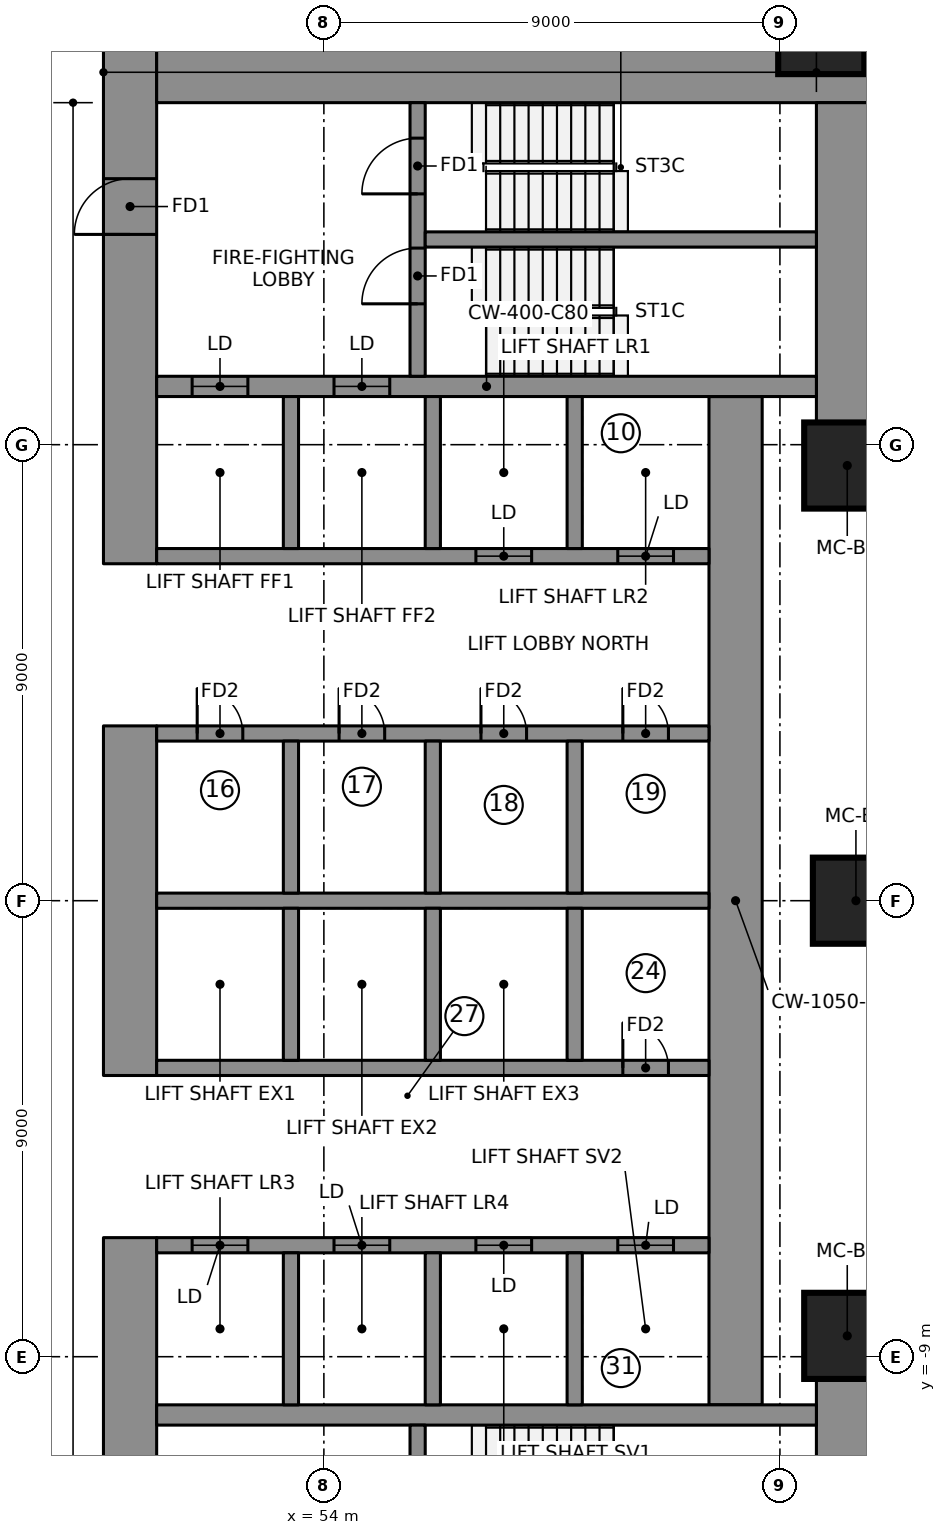
"""IFC4 building model, lengths in metres.
Left out: names, types, materials, properties, quantities, classifications, styles, units other than length and angle.
Written with IfcOpenShell. Run it as: python <this file> out.ifc"""

import sys

from ifc_helpers import new_model, si_unit, direction, frame, frame_2d, origin, origin_2d, place, context, subcontext, project, spatial, rectangle, extrude, element, fill, save


model = new_model("IFC4")
c1 = context("Model", 3, precision=1e-05, world=origin(), true_north=direction((0.0, 1.0)))
c2 = subcontext(c1, "Body", "Model", "MODEL_VIEW")
j1 = project(units=[si_unit("LENGTHUNIT", "METRE"), si_unit("PLANEANGLEUNIT", "RADIAN")], contexts=[c1])
p1 = place(None, origin())
s1 = spatial("IfcSite", under=j1, at=p1, CompositionType="ELEMENT")
p2 = place(p1, origin())
s2 = spatial("IfcBuilding", under=s1, at=p2, CompositionType="ELEMENT")
p3 = place(p2, frame((0.0, 0.0, 116.85)))
s3 = spatial("IfcBuildingStorey", under=s2, at=p3, CompositionType="ELEMENT", Elevation=116.85)
p4 = place(p3, frame((50.175, 6.65, 0.0), z_axis=(0.0, 0.0, 1.0), x_axis=(0.0, 1.0, 0.0)))
e1 = element("IfcWall", 1, at=p4, inside=s3, PredefinedType="SHEAR", context=c2, shape_type="SweptSolid", body=[
    extrude(rectangle(XDim=10.15, YDim=1.05, at=frame_2d((5.075, 0.0))), origin(), (0.0, 0.0, 1.0), 3.55),
])
p5 = place(p4, frame((6.5, 0.0, 0.0)))
e2 = element("IfcOpeningElement", 2, at=p5, cuts=e1, PredefinedType="OPENING", context=c2, shape_type="SweptSolid", body=[
    extrude(rectangle(XDim=1.1, YDim=2.1, at=frame_2d((0.55, 1.05))), frame((0.0, 0.535, 0.0), z_axis=(0.0, -1.0, 0.0), x_axis=(1.0, 0.0, 0.0)), (0.0, 0.0, 1.0), 1.07),
])
p6 = place(p3, frame((50.175, -3.45, 0.0), z_axis=(0.0, 0.0, 1.0), x_axis=(0.0, 1.0, 0.0)))
e3 = element("IfcWall", 3, at=p6, inside=s3, PredefinedType="SHEAR", context=c2, shape_type="SweptSolid", body=[
    extrude(rectangle(XDim=6.9, YDim=1.05, at=frame_2d((3.45, 0.0))), origin(), (0.0, 0.0, 1.0), 3.55),
])
p7 = place(p3, frame((50.175, -16.8, 0.0), z_axis=(0.0, 0.0, 1.0), x_axis=(0.0, 1.0, 0.0)))
e4 = element("IfcWall", 4, at=p7, inside=s3, PredefinedType="SHEAR", context=c2, shape_type="SweptSolid", body=[
    extrude(rectangle(XDim=10.15, YDim=1.05, at=frame_2d((5.075, 0.0))), origin(), (0.0, 0.0, 1.0), 3.55),
])
p8 = place(p7, frame((2.55, 0.0, 0.0)))
e5 = element("IfcOpeningElement", 5, at=p8, cuts=e4, PredefinedType="OPENING", context=c2, shape_type="SweptSolid", body=[
    extrude(rectangle(XDim=1.1, YDim=2.1, at=frame_2d((0.55, 1.05))), frame((0.0, 0.535, 0.0), z_axis=(0.0, -1.0, 0.0), x_axis=(1.0, 0.0, 0.0)), (0.0, 0.0, 1.0), 1.07),
])
p9 = place(p3, frame((50.7, 16.275, 0.0), z_axis=(0.0, 0.0, 1.0), x_axis=(1.0, 0.0, 0.0)))
e6 = element("IfcWall", 6, at=p9, inside=s3, PredefinedType="SHEAR", context=c2, shape_type="SweptSolid", body=[
    extrude(rectangle(XDim=14.07, YDim=1.05, at=frame_2d((7.035, 0.0))), origin(), (0.0, 0.0, 1.0), 3.55),
])
for number, where, z_axis, x_axis in (
    (7, (64.245, 9.389, 0.0), (0.0, 0.0, 1.0), (0.0, 1.0, 0.0)),
    (8, (64.245, -15.75, 0.0), (0.0, 0.0, 1.0), (0.0, 1.0, 0.0)),
):
    element("IfcWall", number, at=place(p3, frame(where, z_axis=z_axis, x_axis=x_axis)), inside=s3, PredefinedType="SHEAR", context=c2, shape_type="SweptSolid", body=[
        extrude(rectangle(XDim=6.361, YDim=1.05, at=frame_2d((3.181, 0.0))), origin(), (0.0, 0.0, 1.0), 3.55),
    ])
p10 = place(p3, frame((62.125, -9.95, 0.0), z_axis=(0.0, 0.0, 1.0), x_axis=(0.0, 1.0, 0.0)))
e9 = element("IfcWall", 9, at=p10, inside=s3, PredefinedType="SHEAR", context=c2, shape_type="SweptSolid", body=[
    extrude(rectangle(XDim=19.9, YDim=1.05, at=frame_2d((9.95, 0.0))), origin(), (0.0, 0.0, 1.0), 3.55),
])
p11 = place(p3, frame((50.7, 10.15, 0.0), z_axis=(0.0, 0.0, 1.0), x_axis=(1.0, 0.0, 0.0)))
e10 = element("IfcWall", 10, at=p11, inside=s3, PredefinedType="SHEAR", context=c2, shape_type="SweptSolid", body=[
    extrude(rectangle(XDim=13.02, YDim=0.4, at=frame_2d((6.51, 0.0))), origin(), (0.0, 0.0, 1.0), 3.55),
])
p12 = place(p11, frame((0.7, 0.0, 0.0)))
e11 = element("IfcOpeningElement", 11, at=p12, cuts=e10, PredefinedType="OPENING", context=c2, shape_type="SweptSolid", body=[
    extrude(rectangle(XDim=1.1, YDim=2.1, at=frame_2d((0.55, 1.05))), frame((0.0, 0.21, 0.0), z_axis=(0.0, -1.0, 0.0), x_axis=(1.0, 0.0, 0.0)), (0.0, 0.0, 1.0), 0.42),
])
p13 = place(p11, frame((3.5, 0.0, 0.0)))
e12 = element("IfcOpeningElement", 12, at=p13, cuts=e10, PredefinedType="OPENING", context=c2, shape_type="SweptSolid", body=[
    extrude(rectangle(XDim=1.1, YDim=2.1, at=frame_2d((0.55, 1.05))), frame((0.0, 0.21, 0.0), z_axis=(0.0, -1.0, 0.0), x_axis=(1.0, 0.0, 0.0)), (0.0, 0.0, 1.0), 0.42),
])
p14 = place(p3, frame((50.7, -10.15, 0.0), z_axis=(0.0, 0.0, 1.0), x_axis=(1.0, 0.0, 0.0)))
e13 = element("IfcWall", 13, at=p14, inside=s3, PredefinedType="SHEAR", context=c2, shape_type="SweptSolid", body=[
    extrude(rectangle(XDim=13.02, YDim=0.4, at=frame_2d((6.51, 0.0))), origin(), (0.0, 0.0, 1.0), 3.55),
])
p15 = place(p3, frame((50.7, 0.0, 0.0), z_axis=(0.0, 0.0, 1.0), x_axis=(1.0, 0.0, 0.0)))
e14 = element("IfcWall", 14, at=p15, inside=s3, PredefinedType="SHEAR", context=c2, shape_type="SweptSolid", body=[
    extrude(rectangle(XDim=10.9, YDim=0.3, at=frame_2d((5.45, 0.0))), origin(), (0.0, 0.0, 1.0), 3.55),
])
p16 = place(p3, frame((50.7, 3.3, 0.0), z_axis=(0.0, 0.0, 1.0), x_axis=(1.0, 0.0, 0.0)))
e15 = element("IfcWall", 15, at=p16, inside=s3, PredefinedType="SHEAR", context=c2, shape_type="SweptSolid", body=[
    extrude(rectangle(XDim=10.9, YDim=0.3, at=frame_2d((5.45, 0.0))), origin(), (0.0, 0.0, 1.0), 3.55),
])
p17 = place(p16, frame((0.8, 0.0, 0.0)))
e16 = element("IfcOpeningElement", 16, at=p17, cuts=e15, PredefinedType="OPENING", context=c2, shape_type="SweptSolid", body=[
    extrude(rectangle(XDim=0.9, YDim=2.1, at=frame_2d((0.45, 1.05))), frame((0.0, 0.16, 0.0), z_axis=(0.0, -1.0, 0.0), x_axis=(1.0, 0.0, 0.0)), (0.0, 0.0, 1.0), 0.32),
])
p18 = place(p16, frame((3.6, 0.0, 0.0)))
e17 = element("IfcOpeningElement", 17, at=p18, cuts=e15, PredefinedType="OPENING", context=c2, shape_type="SweptSolid", body=[
    extrude(rectangle(XDim=0.9, YDim=2.1, at=frame_2d((0.45, 1.05))), frame((0.0, 0.16, 0.0), z_axis=(0.0, -1.0, 0.0), x_axis=(1.0, 0.0, 0.0)), (0.0, 0.0, 1.0), 0.32),
])
p19 = place(p16, frame((6.4, 0.0, 0.0)))
e18 = element("IfcOpeningElement", 18, at=p19, cuts=e15, PredefinedType="OPENING", context=c2, shape_type="SweptSolid", body=[
    extrude(rectangle(XDim=0.9, YDim=2.1, at=frame_2d((0.45, 1.05))), frame((0.0, 0.16, 0.0), z_axis=(0.0, -1.0, 0.0), x_axis=(1.0, 0.0, 0.0)), (0.0, 0.0, 1.0), 0.32),
])
p20 = place(p16, frame((9.2, 0.0, 0.0)))
e19 = element("IfcOpeningElement", 19, at=p20, cuts=e15, PredefinedType="OPENING", context=c2, shape_type="SweptSolid", body=[
    extrude(rectangle(XDim=0.9, YDim=2.1, at=frame_2d((0.45, 1.05))), frame((0.0, 0.16, 0.0), z_axis=(0.0, -1.0, 0.0), x_axis=(1.0, 0.0, 0.0)), (0.0, 0.0, 1.0), 0.32),
])
p21 = place(p3, frame((50.7, 6.8, 0.0), z_axis=(0.0, 0.0, 1.0), x_axis=(1.0, 0.0, 0.0)))
e20 = element("IfcWall", 20, at=p21, inside=s3, PredefinedType="SHEAR", context=c2, shape_type="SweptSolid", body=[
    extrude(rectangle(XDim=10.9, YDim=0.3, at=frame_2d((5.45, 0.0))), origin(), (0.0, 0.0, 1.0), 3.55),
])
p22 = place(p21, frame((6.3, 0.0, 0.0)))
e21 = element("IfcOpeningElement", 21, at=p22, cuts=e20, PredefinedType="OPENING", context=c2, shape_type="SweptSolid", body=[
    extrude(rectangle(XDim=1.1, YDim=2.1, at=frame_2d((0.55, 1.05))), frame((0.0, 0.16, 0.0), z_axis=(0.0, -1.0, 0.0), x_axis=(1.0, 0.0, 0.0)), (0.0, 0.0, 1.0), 0.32),
])
p23 = place(p21, frame((9.1, 0.0, 0.0)))
e22 = element("IfcOpeningElement", 22, at=p23, cuts=e20, PredefinedType="OPENING", context=c2, shape_type="SweptSolid", body=[
    extrude(rectangle(XDim=1.1, YDim=2.1, at=frame_2d((0.55, 1.05))), frame((0.0, 0.16, 0.0), z_axis=(0.0, -1.0, 0.0), x_axis=(1.0, 0.0, 0.0)), (0.0, 0.0, 1.0), 0.32),
])
for number, where, z_axis, x_axis in (
    (23, (53.35, 0.15, 0.0), (0.0, 0.0, 1.0), (0.0, 1.0, 0.0)),
    (24, (53.35, 6.95, 0.0), (0.0, 0.0, 1.0), (0.0, 1.0, 0.0)),
    (25, (56.15, 0.15, 0.0), (0.0, 0.0, 1.0), (0.0, 1.0, 0.0)),
    (26, (56.15, 6.95, 0.0), (0.0, 0.0, 1.0), (0.0, 1.0, 0.0)),
    (27, (58.95, 0.15, 0.0), (0.0, 0.0, 1.0), (0.0, 1.0, 0.0)),
    (28, (58.95, 6.95, 0.0), (0.0, 0.0, 1.0), (0.0, 1.0, 0.0)),
):
    element("IfcWall", number, at=place(p3, frame(where, z_axis=z_axis, x_axis=x_axis)), inside=s3, PredefinedType="SHEAR", context=c2, shape_type="SweptSolid", body=[
        extrude(rectangle(XDim=3.0, YDim=0.3, at=frame_2d((1.5, 0.0))), origin(), (0.0, 0.0, 1.0), 3.55),
    ])
p24 = place(p3, frame((50.7, -3.3, 0.0), z_axis=(0.0, 0.0, 1.0), x_axis=(1.0, 0.0, 0.0)))
e29 = element("IfcWall", 29, at=p24, inside=s3, PredefinedType="SHEAR", context=c2, shape_type="SweptSolid", body=[
    extrude(rectangle(XDim=10.9, YDim=0.3, at=frame_2d((5.45, 0.0))), origin(), (0.0, 0.0, 1.0), 3.55),
])
p25 = place(p24, frame((9.2, 0.0, 0.0)))
e30 = element("IfcOpeningElement", 30, at=p25, cuts=e29, PredefinedType="OPENING", context=c2, shape_type="SweptSolid", body=[
    extrude(rectangle(XDim=0.9, YDim=2.1, at=frame_2d((0.45, 1.05))), frame((0.0, 0.16, 0.0), z_axis=(0.0, -1.0, 0.0), x_axis=(1.0, 0.0, 0.0)), (0.0, 0.0, 1.0), 0.32),
])
p26 = place(p3, frame((50.7, -6.8, 0.0), z_axis=(0.0, 0.0, 1.0), x_axis=(1.0, 0.0, 0.0)))
e31 = element("IfcWall", 31, at=p26, inside=s3, PredefinedType="SHEAR", context=c2, shape_type="SweptSolid", body=[
    extrude(rectangle(XDim=10.9, YDim=0.3, at=frame_2d((5.45, 0.0))), origin(), (0.0, 0.0, 1.0), 3.55),
])
p27 = place(p26, frame((0.7, 0.0, 0.0)))
e32 = element("IfcOpeningElement", 32, at=p27, cuts=e31, PredefinedType="OPENING", context=c2, shape_type="SweptSolid", body=[
    extrude(rectangle(XDim=1.1, YDim=2.1, at=frame_2d((0.55, 1.05))), frame((0.0, 0.16, 0.0), z_axis=(0.0, -1.0, 0.0), x_axis=(1.0, 0.0, 0.0)), (0.0, 0.0, 1.0), 0.32),
])
p28 = place(p26, frame((3.5, 0.0, 0.0)))
e33 = element("IfcOpeningElement", 33, at=p28, cuts=e31, PredefinedType="OPENING", context=c2, shape_type="SweptSolid", body=[
    extrude(rectangle(XDim=1.1, YDim=2.1, at=frame_2d((0.55, 1.05))), frame((0.0, 0.16, 0.0), z_axis=(0.0, -1.0, 0.0), x_axis=(1.0, 0.0, 0.0)), (0.0, 0.0, 1.0), 0.32),
])
p29 = place(p26, frame((6.3, 0.0, 0.0)))
e34 = element("IfcOpeningElement", 34, at=p29, cuts=e31, PredefinedType="OPENING", context=c2, shape_type="SweptSolid", body=[
    extrude(rectangle(XDim=1.1, YDim=2.1, at=frame_2d((0.55, 1.05))), frame((0.0, 0.16, 0.0), z_axis=(0.0, -1.0, 0.0), x_axis=(1.0, 0.0, 0.0)), (0.0, 0.0, 1.0), 0.32),
])
p30 = place(p26, frame((9.1, 0.0, 0.0)))
e35 = element("IfcOpeningElement", 35, at=p30, cuts=e31, PredefinedType="OPENING", context=c2, shape_type="SweptSolid", body=[
    extrude(rectangle(XDim=1.1, YDim=2.1, at=frame_2d((0.55, 1.05))), frame((0.0, 0.16, 0.0), z_axis=(0.0, -1.0, 0.0), x_axis=(1.0, 0.0, 0.0)), (0.0, 0.0, 1.0), 0.32),
])
for number, where, z_axis, x_axis in (
    (36, (53.35, -3.15, 0.0), (0.0, 0.0, 1.0), (0.0, 1.0, 0.0)),
    (37, (53.35, -9.95, 0.0), (0.0, 0.0, 1.0), (0.0, 1.0, 0.0)),
    (38, (56.15, -3.15, 0.0), (0.0, 0.0, 1.0), (0.0, 1.0, 0.0)),
    (39, (56.15, -9.95, 0.0), (0.0, 0.0, 1.0), (0.0, 1.0, 0.0)),
    (40, (58.95, -3.15, 0.0), (0.0, 0.0, 1.0), (0.0, 1.0, 0.0)),
    (41, (58.95, -9.95, 0.0), (0.0, 0.0, 1.0), (0.0, 1.0, 0.0)),
):
    element("IfcWall", number, at=place(p3, frame(where, z_axis=z_axis, x_axis=x_axis)), inside=s3, PredefinedType="SHEAR", context=c2, shape_type="SweptSolid", body=[
        extrude(rectangle(XDim=3.0, YDim=0.3, at=frame_2d((1.5, 0.0))), origin(), (0.0, 0.0, 1.0), 3.55),
    ])
p31 = place(p3, frame((55.85, 10.35, 0.0), z_axis=(0.0, 0.0, 1.0), x_axis=(0.0, 1.0, 0.0)))
e42 = element("IfcWall", 42, at=p31, inside=s3, PredefinedType="SHEAR", context=c2, shape_type="SweptSolid", body=[
    extrude(rectangle(XDim=5.4, YDim=0.3, at=frame_2d((2.7, 0.0))), origin(), (0.0, 0.0, 1.0), 3.55),
])
p32 = place(p31, frame((1.43, 0.0, 0.0)))
e43 = element("IfcOpeningElement", 43, at=p32, cuts=e42, PredefinedType="OPENING", context=c2, shape_type="SweptSolid", body=[
    extrude(rectangle(XDim=1.1, YDim=2.1, at=frame_2d((0.55, 1.05))), frame((0.0, 0.16, 0.0), z_axis=(0.0, -1.0, 0.0), x_axis=(1.0, 0.0, 0.0)), (0.0, 0.0, 1.0), 0.32),
])
p33 = place(p31, frame((3.6, 0.0, 0.0)))
e44 = element("IfcOpeningElement", 44, at=p33, cuts=e42, PredefinedType="OPENING", context=c2, shape_type="SweptSolid", body=[
    extrude(rectangle(XDim=1.1, YDim=2.1, at=frame_2d((0.55, 1.05))), frame((0.0, 0.16, 0.0), z_axis=(0.0, -1.0, 0.0), x_axis=(1.0, 0.0, 0.0)), (0.0, 0.0, 1.0), 0.32),
])
p34 = place(p3, frame((55.85, -15.75, 0.0), z_axis=(0.0, 0.0, 1.0), x_axis=(0.0, 1.0, 0.0)))
e45 = element("IfcWall", 45, at=p34, inside=s3, PredefinedType="SHEAR", context=c2, shape_type="SweptSolid", body=[
    extrude(rectangle(XDim=5.4, YDim=0.3, at=frame_2d((2.7, 0.0))), origin(), (0.0, 0.0, 1.0), 3.55),
])
p35 = place(p34, frame((3.6, 0.0, 0.0)))
e46 = element("IfcOpeningElement", 46, at=p35, cuts=e45, PredefinedType="OPENING", context=c2, shape_type="SweptSolid", body=[
    extrude(rectangle(XDim=1.1, YDim=2.1, at=frame_2d((0.55, 1.05))), frame((0.0, 0.16, 0.0), z_axis=(0.0, -1.0, 0.0), x_axis=(1.0, 0.0, 0.0)), (0.0, 0.0, 1.0), 0.32),
])
p36 = place(p34, frame((0.8, 0.0, 0.0)))
e47 = element("IfcOpeningElement", 47, at=p36, cuts=e45, PredefinedType="OPENING", context=c2, shape_type="SweptSolid", body=[
    extrude(rectangle(XDim=0.9, YDim=2.1, at=frame_2d((0.45, 1.05))), frame((0.0, 0.16, 0.0), z_axis=(0.0, -1.0, 0.0), x_axis=(1.0, 0.0, 0.0)), (0.0, 0.0, 1.0), 0.32),
])
p37 = place(p3, frame((56.0, 13.05, 0.0), z_axis=(0.0, 0.0, 1.0), x_axis=(1.0, 0.0, 0.0)))
e48 = element("IfcWall", 48, at=p37, inside=s3, PredefinedType="SHEAR", context=c2, shape_type="SweptSolid", body=[
    extrude(rectangle(XDim=7.72, YDim=0.3, at=frame_2d((3.86, 0.0))), origin(), (0.0, 0.0, 1.0), 3.55),
])
for number, where, z_axis, x_axis in (
    (49, (64.329, -8.589, 0.0), (0.0, 0.0, 1.0), (1.0, 0.0, 0.0)),
    (50, (64.5, 0.0, 0.0), (0.0, 0.0, 1.0), (1.0, 0.0, 0.0)),
    (51, (64.329, 8.589, 0.0), (0.0, 0.0, 1.0), (1.0, 0.0, 0.0)),
    (52, (63.816, 17.164, 0.0), (0.0, 0.0, 1.0), (1.0, 0.0, 0.0)),
):
    element("IfcColumn", number, at=place(p3, frame(where, z_axis=z_axis, x_axis=x_axis)), inside=s3, PredefinedType="COLUMN", context=c2, shape_type="SweptSolid", body=[
        extrude(rectangle(XDim=1.7, YDim=1.7, at=origin_2d()), origin(), (0.0, 0.0, 1.0), 3.55),
    ])
p38 = place(p12, origin())
e53 = element("IfcDoor", 53, at=p38, inside=s3, OperationType="DOUBLE_DOOR_SLIDING", PredefinedType="DOOR", context=c2, shape_type="SweptSolid", body=[
    extrude(rectangle(XDim=1.1, YDim=2.1, at=frame_2d((0.55, 1.05))), frame((0.0, 0.025, 0.0), z_axis=(0.0, -1.0, 0.0), x_axis=(1.0, 0.0, 0.0)), (0.0, 0.0, 1.0), 0.05),
])
fill(e11, e53)
p39 = place(p13, origin())
e54 = element("IfcDoor", 54, at=p39, inside=s3, OperationType="DOUBLE_DOOR_SLIDING", PredefinedType="DOOR", context=c2, shape_type="SweptSolid", body=[
    extrude(rectangle(XDim=1.1, YDim=2.1, at=frame_2d((0.55, 1.05))), frame((0.0, 0.025, 0.0), z_axis=(0.0, -1.0, 0.0), x_axis=(1.0, 0.0, 0.0)), (0.0, 0.0, 1.0), 0.05),
])
fill(e12, e54)
p40 = place(p22, origin())
e55 = element("IfcDoor", 55, at=p40, inside=s3, OperationType="DOUBLE_DOOR_SLIDING", PredefinedType="DOOR", context=c2, shape_type="SweptSolid", body=[
    extrude(rectangle(XDim=1.1, YDim=2.1, at=frame_2d((0.55, 1.05))), frame((0.0, 0.025, 0.0), z_axis=(0.0, -1.0, 0.0), x_axis=(1.0, 0.0, 0.0)), (0.0, 0.0, 1.0), 0.05),
])
fill(e21, e55)
p41 = place(p23, origin())
e56 = element("IfcDoor", 56, at=p41, inside=s3, OperationType="DOUBLE_DOOR_SLIDING", PredefinedType="DOOR", context=c2, shape_type="SweptSolid", body=[
    extrude(rectangle(XDim=1.1, YDim=2.1, at=frame_2d((0.55, 1.05))), frame((0.0, 0.025, 0.0), z_axis=(0.0, -1.0, 0.0), x_axis=(1.0, 0.0, 0.0)), (0.0, 0.0, 1.0), 0.05),
])
fill(e22, e56)
p42 = place(p27, origin())
e57 = element("IfcDoor", 57, at=p42, inside=s3, OperationType="DOUBLE_DOOR_SLIDING", PredefinedType="DOOR", context=c2, shape_type="SweptSolid", body=[
    extrude(rectangle(XDim=1.1, YDim=2.1, at=frame_2d((0.55, 1.05))), frame((0.0, 0.025, 0.0), z_axis=(0.0, -1.0, 0.0), x_axis=(1.0, 0.0, 0.0)), (0.0, 0.0, 1.0), 0.05),
])
fill(e32, e57)
p43 = place(p28, origin())
e58 = element("IfcDoor", 58, at=p43, inside=s3, OperationType="DOUBLE_DOOR_SLIDING", PredefinedType="DOOR", context=c2, shape_type="SweptSolid", body=[
    extrude(rectangle(XDim=1.1, YDim=2.1, at=frame_2d((0.55, 1.05))), frame((0.0, 0.025, 0.0), z_axis=(0.0, -1.0, 0.0), x_axis=(1.0, 0.0, 0.0)), (0.0, 0.0, 1.0), 0.05),
])
fill(e33, e58)
p44 = place(p29, origin())
e59 = element("IfcDoor", 59, at=p44, inside=s3, OperationType="DOUBLE_DOOR_SLIDING", PredefinedType="DOOR", context=c2, shape_type="SweptSolid", body=[
    extrude(rectangle(XDim=1.1, YDim=2.1, at=frame_2d((0.55, 1.05))), frame((0.0, 0.025, 0.0), z_axis=(0.0, -1.0, 0.0), x_axis=(1.0, 0.0, 0.0)), (0.0, 0.0, 1.0), 0.05),
])
fill(e34, e59)
p45 = place(p30, origin())
e60 = element("IfcDoor", 60, at=p45, inside=s3, OperationType="DOUBLE_DOOR_SLIDING", PredefinedType="DOOR", context=c2, shape_type="SweptSolid", body=[
    extrude(rectangle(XDim=1.1, YDim=2.1, at=frame_2d((0.55, 1.05))), frame((0.0, 0.025, 0.0), z_axis=(0.0, -1.0, 0.0), x_axis=(1.0, 0.0, 0.0)), (0.0, 0.0, 1.0), 0.05),
])
fill(e35, e60)
p46 = place(p32, origin())
e61 = element("IfcDoor", 61, at=p46, inside=s3, OperationType="SINGLE_SWING_RIGHT", PredefinedType="DOOR", context=c2, shape_type="SweptSolid", body=[
    extrude(rectangle(XDim=1.1, YDim=2.1, at=frame_2d((0.55, 1.05))), frame((0.0, 0.025, 0.0), z_axis=(0.0, -1.0, 0.0), x_axis=(1.0, 0.0, 0.0)), (0.0, 0.0, 1.0), 0.05),
])
fill(e43, e61)
p47 = place(p33, origin())
e62 = element("IfcDoor", 62, at=p47, inside=s3, OperationType="SINGLE_SWING_RIGHT", PredefinedType="DOOR", context=c2, shape_type="SweptSolid", body=[
    extrude(rectangle(XDim=1.1, YDim=2.1, at=frame_2d((0.55, 1.05))), frame((0.0, 0.025, 0.0), z_axis=(0.0, -1.0, 0.0), x_axis=(1.0, 0.0, 0.0)), (0.0, 0.0, 1.0), 0.05),
])
fill(e44, e62)
p48 = place(p5, origin())
e63 = element("IfcDoor", 63, at=p48, inside=s3, OperationType="SINGLE_SWING_RIGHT", PredefinedType="DOOR", context=c2, shape_type="SweptSolid", body=[
    extrude(rectangle(XDim=1.1, YDim=2.1, at=frame_2d((0.55, 1.05))), frame((0.0, 0.025, 0.0), z_axis=(0.0, -1.0, 0.0), x_axis=(1.0, 0.0, 0.0)), (0.0, 0.0, 1.0), 0.05),
])
fill(e2, e63)
p49 = place(p17, origin())
e64 = element("IfcDoor", 64, at=p49, inside=s3, OperationType="SINGLE_SWING_LEFT", PredefinedType="DOOR", context=c2, shape_type="SweptSolid", body=[
    extrude(rectangle(XDim=0.9, YDim=2.1, at=frame_2d((0.45, 1.05))), frame((0.0, 0.025, 0.0), z_axis=(0.0, -1.0, 0.0), x_axis=(1.0, 0.0, 0.0)), (0.0, 0.0, 1.0), 0.05),
])
fill(e16, e64)
p50 = place(p18, origin())
e65 = element("IfcDoor", 65, at=p50, inside=s3, OperationType="SINGLE_SWING_LEFT", PredefinedType="DOOR", context=c2, shape_type="SweptSolid", body=[
    extrude(rectangle(XDim=0.9, YDim=2.1, at=frame_2d((0.45, 1.05))), frame((0.0, 0.025, 0.0), z_axis=(0.0, -1.0, 0.0), x_axis=(1.0, 0.0, 0.0)), (0.0, 0.0, 1.0), 0.05),
])
fill(e17, e65)
p51 = place(p19, origin())
e66 = element("IfcDoor", 66, at=p51, inside=s3, OperationType="SINGLE_SWING_LEFT", PredefinedType="DOOR", context=c2, shape_type="SweptSolid", body=[
    extrude(rectangle(XDim=0.9, YDim=2.1, at=frame_2d((0.45, 1.05))), frame((0.0, 0.025, 0.0), z_axis=(0.0, -1.0, 0.0), x_axis=(1.0, 0.0, 0.0)), (0.0, 0.0, 1.0), 0.05),
])
fill(e18, e66)
p52 = place(p20, origin())
e67 = element("IfcDoor", 67, at=p52, inside=s3, OperationType="SINGLE_SWING_LEFT", PredefinedType="DOOR", context=c2, shape_type="SweptSolid", body=[
    extrude(rectangle(XDim=0.9, YDim=2.1, at=frame_2d((0.45, 1.05))), frame((0.0, 0.025, 0.0), z_axis=(0.0, -1.0, 0.0), x_axis=(1.0, 0.0, 0.0)), (0.0, 0.0, 1.0), 0.05),
])
fill(e19, e67)
p53 = place(p25, origin())
e68 = element("IfcDoor", 68, at=p53, inside=s3, OperationType="SINGLE_SWING_LEFT", PredefinedType="DOOR", context=c2, shape_type="SweptSolid", body=[
    extrude(rectangle(XDim=0.9, YDim=2.1, at=frame_2d((0.45, 1.05))), frame((0.0, 0.025, 0.0), z_axis=(0.0, -1.0, 0.0), x_axis=(1.0, 0.0, 0.0)), (0.0, 0.0, 1.0), 0.05),
])
fill(e30, e68)
save(model, sys.argv[1])
